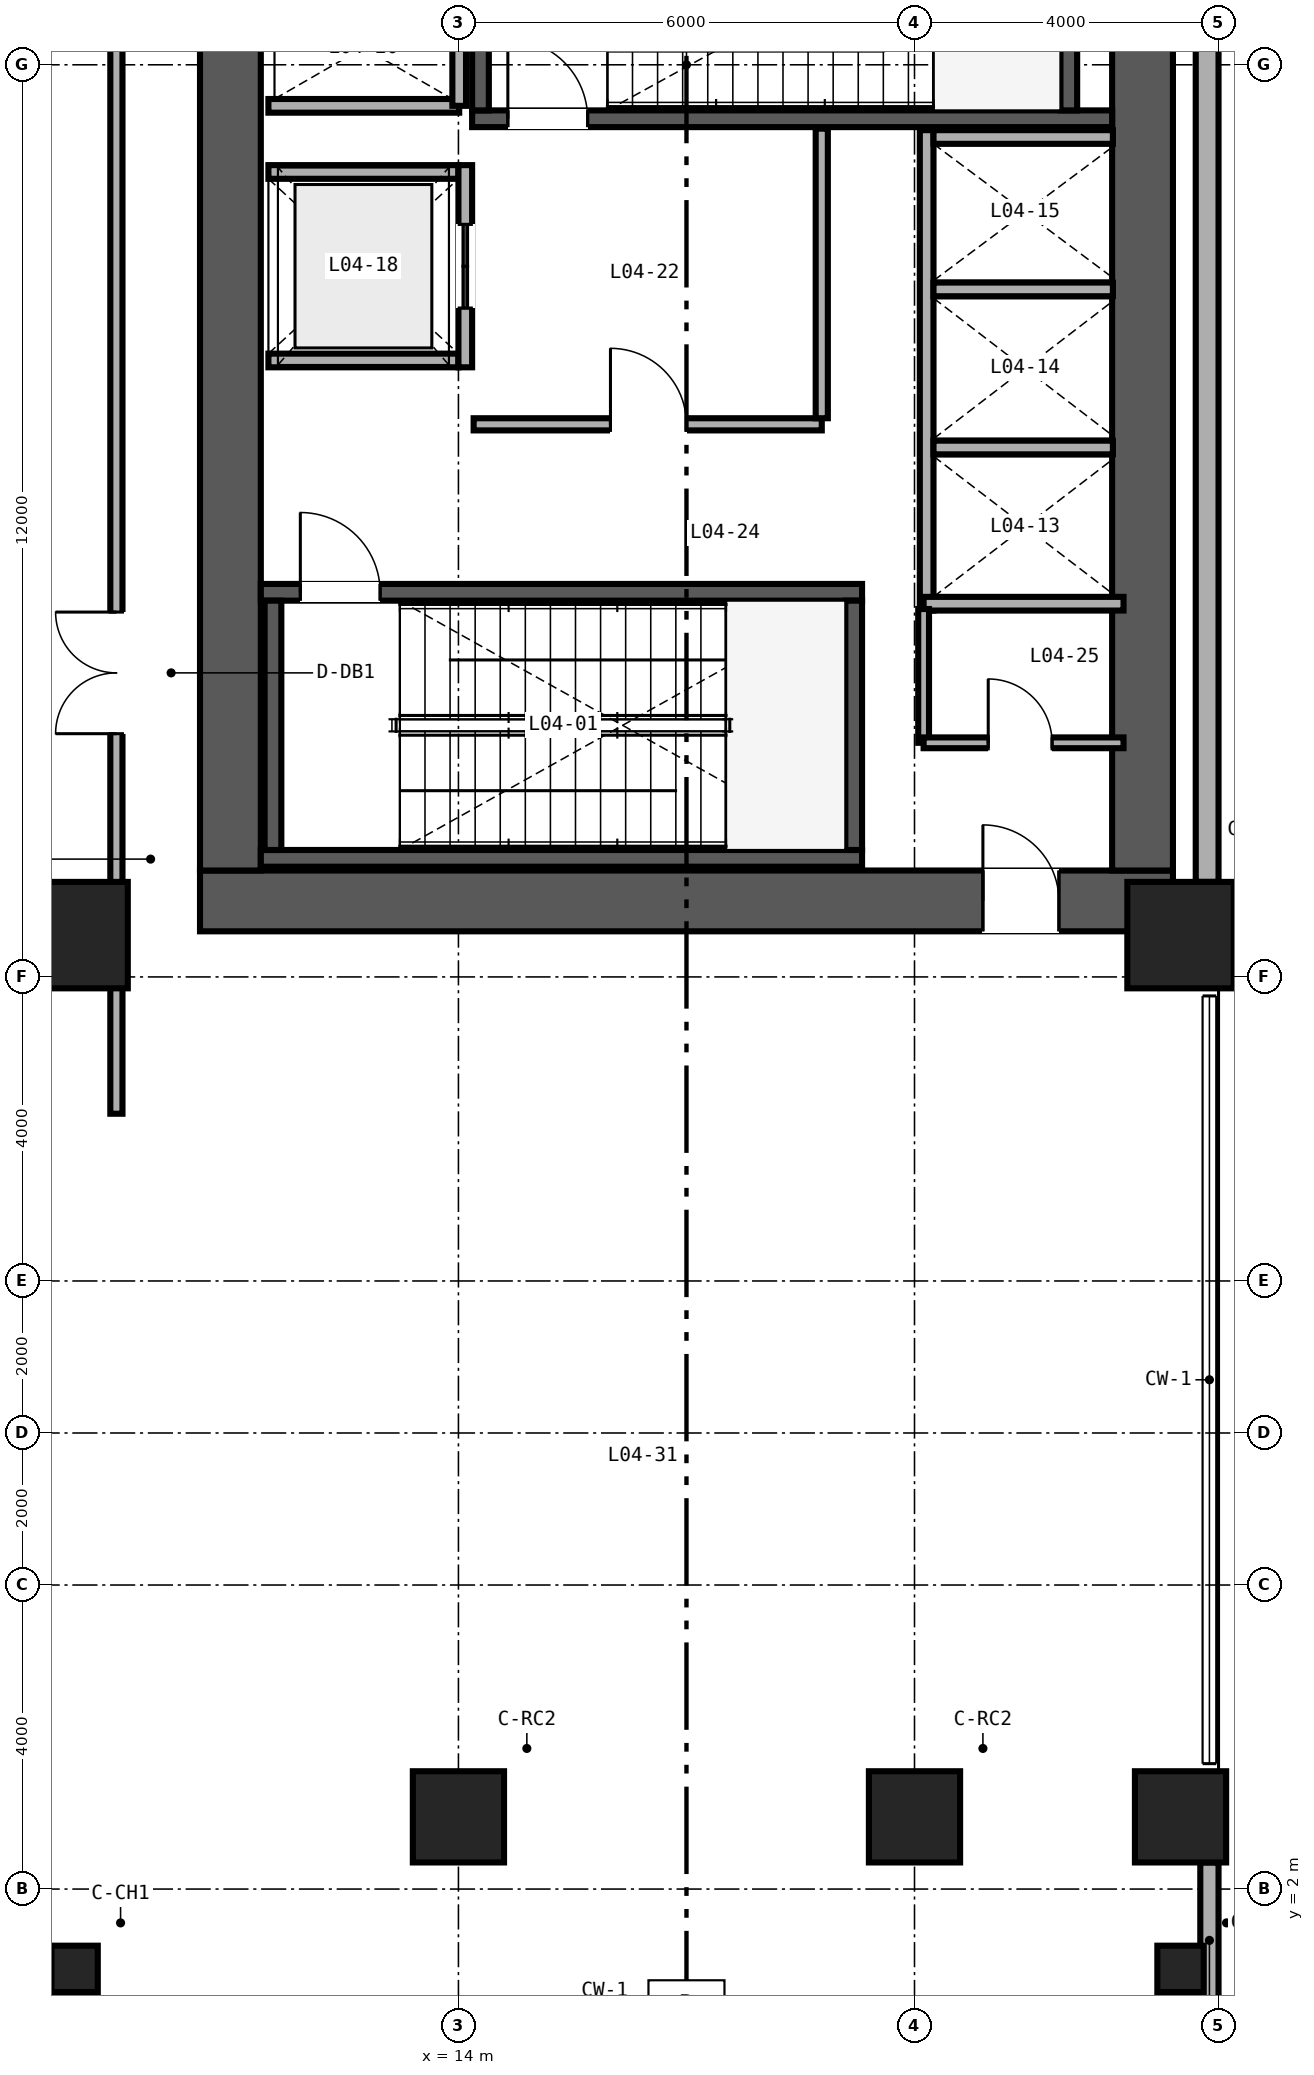
"""IFC4 building model, lengths in metres.
Left out: names, types, materials, properties, quantities, classifications, styles, units other than length and angle.
Written with IfcOpenShell. Run it as: python <this file> out.ifc"""

import sys

from ifc_helpers import new_model, si_unit, direction, frame, frame_2d, origin, origin_2d, place, context, subcontext, project, spatial, rectangle, hollow_circle, extrude, source, transform, mapped, element, fill, save


model = new_model("IFC4")
c1 = context("Model", 3, precision=1e-05, world=origin(), true_north=direction((0.0, 1.0)))
c2 = subcontext(c1, "Body", "Model", "MODEL_VIEW")
j1 = project(units=[si_unit("LENGTHUNIT", "METRE"), si_unit("PLANEANGLEUNIT", "RADIAN")], contexts=[c1])
p1 = place(None, origin())
s1 = spatial("IfcSite", under=j1, at=p1, CompositionType="ELEMENT")
p2 = place(p1, origin())
s2 = spatial("IfcBuilding", under=s1, at=p2, CompositionType="ELEMENT")
p3 = place(p2, frame((0.0, 0.0, 19.2)))
s3 = spatial("IfcBuildingStorey", under=s2, at=p3, CompositionType="ELEMENT", Elevation=19.2)
p4 = place(p3, frame((10.6, 15.0, 0.0), z_axis=(0.0, 0.0, 1.0), x_axis=(1.0, 0.0, 0.0)))
e1 = element("IfcWall", 1, at=p4, inside=s3, PredefinedType="SHEAR", context=c2, shape_type="SweptSolid", body=[
    extrude(rectangle(XDim=12.8, YDim=0.8, at=frame_2d((6.4, 0.0))), origin(), (0.0, 0.0, 1.0), 4.48),
])
p5 = place(p4, frame((10.3, 0.0, 0.0)))
e2 = element("IfcOpeningElement", 2, at=p5, cuts=e1, PredefinedType="OPENING", context=c2, shape_type="SweptSolid", body=[
    extrude(rectangle(XDim=1.0, YDim=2.15, at=frame_2d((0.5, 1.075))), frame((0.0, 0.41, 0.0), z_axis=(0.0, -1.0, 0.0), x_axis=(1.0, 0.0, 0.0)), (0.0, 0.0, 1.0), 0.82),
])
for number, where, z_axis, x_axis in (
    (3, (11.0, 15.4, 0.0), (0.0, 0.0, 1.0), (0.0, 1.0, 0.0)),
    (4, (23.0, 15.4, 0.0), (0.0, 0.0, 1.0), (0.0, 1.0, 0.0)),
):
    element("IfcWall", number, at=place(p3, frame(where, z_axis=z_axis, x_axis=x_axis)), inside=s3, PredefinedType="SHEAR", context=c2, shape_type="SweptSolid", body=[
        extrude(rectangle(XDim=21.2, YDim=0.8, at=frame_2d((10.6, 0.0))), origin(), (0.0, 0.0, 1.0), 4.48),
    ])
p6 = place(p3, frame((11.4, 15.56, 0.0), z_axis=(0.0, 0.0, 1.0), x_axis=(1.0, 0.0, 0.0)))
e5 = element("IfcWall", 5, at=p6, inside=s3, PredefinedType="SHEAR", context=c2, shape_type="SweptSolid", body=[
    extrude(rectangle(XDim=7.91, YDim=0.22, at=frame_2d((3.955, 0.0))), origin(), (0.0, 0.0, 1.0), 4.6),
])
p7 = place(p3, frame((11.4, 19.06, 0.0), z_axis=(0.0, 0.0, 1.0), x_axis=(1.0, 0.0, 0.0)))
e6 = element("IfcWall", 6, at=p7, inside=s3, PredefinedType="SHEAR", context=c2, shape_type="SweptSolid", body=[
    extrude(rectangle(XDim=7.91, YDim=0.22, at=frame_2d((3.955, 0.0))), origin(), (0.0, 0.0, 1.0), 4.6),
])
p8 = place(p7, frame((0.52, 0.0, 0.0)))
e7 = element("IfcOpeningElement", 7, at=p8, cuts=e6, PredefinedType="OPENING", context=c2, shape_type="SweptSolid", body=[
    extrude(rectangle(XDim=1.05, YDim=2.15, at=frame_2d((0.525, 1.075))), frame((0.0, 0.12, 0.0), z_axis=(0.0, -1.0, 0.0), x_axis=(1.0, 0.0, 0.0)), (0.0, 0.0, 1.0), 0.24),
])
for number, where, z_axis, x_axis in (
    (8, (11.56, 15.67, 0.0), (0.0, 0.0, 1.0), (0.0, 1.0, 0.0)),
    (9, (19.2, 15.67, 0.0), (0.0, 0.0, 1.0), (0.0, 1.0, 0.0)),
):
    element("IfcWall", number, at=place(p3, frame(where, z_axis=z_axis, x_axis=x_axis)), inside=s3, PredefinedType="SHEAR", context=c2, shape_type="SweptSolid", body=[
        extrude(rectangle(XDim=3.28, YDim=0.22, at=frame_2d((1.64, 0.0))), origin(), (0.0, 0.0, 1.0), 4.6),
    ])
p9 = place(p3, frame((14.18, 25.29, 0.0), z_axis=(0.0, 0.0, 1.0), x_axis=(1.0, 0.0, 0.0)))
e10 = element("IfcWall", 10, at=p9, inside=s3, PredefinedType="SHEAR", context=c2, shape_type="SweptSolid", body=[
    extrude(rectangle(XDim=8.42, YDim=0.22, at=frame_2d((4.21, 0.0))), origin(), (0.0, 0.0, 1.0), 4.6),
])
p10 = place(p9, frame((0.47, 0.0, 0.0)))
e11 = element("IfcOpeningElement", 11, at=p10, cuts=e10, PredefinedType="OPENING", context=c2, shape_type="SweptSolid", body=[
    extrude(rectangle(XDim=1.05, YDim=2.15, at=frame_2d((0.525, 1.075))), frame((0.0, 0.12, 0.0), z_axis=(0.0, -1.0, 0.0), x_axis=(1.0, 0.0, 0.0)), (0.0, 0.0, 1.0), 0.24),
])
for number, where, z_axis, x_axis in (
    (12, (14.29, 25.4, 0.0), (0.0, 0.0, 1.0), (0.0, 1.0, 0.0)),
    (13, (22.03, 25.4, 0.0), (0.0, 0.0, 1.0), (0.0, 1.0, 0.0)),
):
    element("IfcWall", number, at=place(p3, frame(where, z_axis=z_axis, x_axis=x_axis)), inside=s3, PredefinedType="SHEAR", context=c2, shape_type="SweptSolid", body=[
        extrude(rectangle(XDim=3.28, YDim=0.22, at=frame_2d((1.64, 0.0))), origin(), (0.0, 0.0, 1.0), 4.6),
    ])
m1 = source(origin(), c2, "Body", "SweptSolid", [
    extrude(hollow_circle(Radius=0.305, WallThickness=0.025, at=origin_2d()), origin(), (0.0, 0.0, 1.0), 4.48),
])
for number, where, z_axis, x_axis in (
    (14, (8.95, 0.95, 0.0), (0.0, 0.0, 1.0), (1.0, 0.0, 0.0)),
    (15, (23.5, 0.95, 0.0), (0.0, 0.0, 1.0), (1.0, 0.0, 0.0)),
):
    element("IfcColumn", number, at=place(p3, frame(where, z_axis=z_axis, x_axis=x_axis)), inside=s3, PredefinedType="COLUMN", context=c2, shape_type="MappedRepresentation", body=[
        mapped(m1, transform((0.0, 0.0, 0.0), scale=1.0)),
    ])
m2 = source(origin(), c2, "Body", "SweptSolid", [
    extrude(rectangle(XDim=1.4, YDim=1.4, at=origin_2d()), origin(), (0.0, 0.0, 1.0), 4.48),
])
for number, where, z_axis, x_axis in (
    (16, (8.95, 14.55, 0.0), (0.0, 0.0, 1.0), (1.0, 0.0, 0.0)),
    (17, (23.5, 14.55, 0.0), (0.0, 0.0, 1.0), (1.0, 0.0, 0.0)),
):
    element("IfcColumn", number, at=place(p3, frame(where, z_axis=z_axis, x_axis=x_axis)), inside=s3, PredefinedType="COLUMN", context=c2, shape_type="MappedRepresentation", body=[
        mapped(m2, transform((0.0, 0.0, 0.0), scale=1.0)),
    ])
m3 = source(origin(), c2, "Body", "SweptSolid", [
    extrude(rectangle(XDim=1.2, YDim=1.2, at=origin_2d()), origin(), (0.0, 0.0, 1.0), 4.48),
])
for number, where, z_axis, x_axis in (
    (18, (14.0, 2.95, 0.0), (0.0, 0.0, 1.0), (1.0, 0.0, 0.0)),
    (19, (20.0, 2.95, 0.0), (0.0, 0.0, 1.0), (1.0, 0.0, 0.0)),
    (20, (23.5, 2.95, 0.0), (0.0, 0.0, 1.0), (1.0, 0.0, 0.0)),
):
    element("IfcColumn", number, at=place(p3, frame(where, z_axis=z_axis, x_axis=x_axis)), inside=s3, PredefinedType="COLUMN", context=c2, shape_type="MappedRepresentation", body=[
        mapped(m3, transform((0.0, 0.0, 0.0), scale=1.0)),
    ])
p11 = place(p3, frame((23.88, 0.3, 0.0), z_axis=(0.0, 0.0, 1.0), x_axis=(0.0, 1.0, 0.0)))
e21 = element("IfcWall", 21, at=p11, inside=s3, PredefinedType="SOLIDWALL", context=c2, shape_type="SweptSolid", body=[
    extrude(rectangle(XDim=2.05, YDim=0.24, at=frame_2d((1.025, 0.0))), origin(), (0.0, 0.0, 1.0), 3.532),
])
p12 = place(p3, frame((23.85, 15.25, 0.0), z_axis=(0.0, 0.0, 1.0), x_axis=(0.0, 1.0, 0.0)))
e22 = element("IfcWall", 22, at=p12, inside=s3, PredefinedType="SOLIDWALL", context=c2, shape_type="SweptSolid", body=[
    extrude(rectangle(XDim=12.2, YDim=0.3, at=frame_2d((6.1, 0.0))), origin(), (0.0, 0.0, 1.0), 3.701),
])
p13 = place(p3, frame((20.16, 18.82, 0.0), z_axis=(0.0, 0.0, 1.0), x_axis=(0.0, 1.0, 0.0)))
e23 = element("IfcWall", 23, at=p13, inside=s3, PredefinedType="SOLIDWALL", context=c2, shape_type="SweptSolid", body=[
    extrude(rectangle(XDim=6.32, YDim=0.18, at=frame_2d((3.16, 0.0))), origin(), (0.0, 0.0, 1.0), 3.38),
])
p14 = place(p3, frame((20.12, 18.91, 0.0), z_axis=(0.0, 0.0, 1.0), x_axis=(1.0, 0.0, 0.0)))
e24 = element("IfcWall", 24, at=p14, inside=s3, PredefinedType="SOLIDWALL", context=c2, shape_type="SweptSolid", body=[
    extrude(rectangle(XDim=2.63, YDim=0.18, at=frame_2d((1.315, 0.0))), origin(), (0.0, 0.0, 1.0), 4.48),
])
p15 = place(p3, frame((20.25, 25.05, 0.0), z_axis=(0.0, 0.0, 1.0), x_axis=(1.0, 0.0, 0.0)))
e25 = element("IfcWall", 25, at=p15, inside=s3, PredefinedType="SOLIDWALL", context=c2, shape_type="SweptSolid", body=[
    extrude(rectangle(XDim=2.36, YDim=0.18, at=frame_2d((1.18, 0.0))), origin(), (0.0, 0.0, 1.0), 4.48),
])
p16 = place(p3, frame((20.25, 20.965, 0.0), z_axis=(0.0, 0.0, 1.0), x_axis=(1.0, 0.0, 0.0)))
e26 = element("IfcWall", 26, at=p16, inside=s3, PredefinedType="SOLIDWALL", context=c2, shape_type="SweptSolid", body=[
    extrude(rectangle(XDim=2.36, YDim=0.18, at=frame_2d((1.18, 0.0))), origin(), (0.0, 0.0, 1.0), 3.38),
])
p17 = place(p3, frame((20.25, 23.045, 0.0), z_axis=(0.0, 0.0, 1.0), x_axis=(1.0, 0.0, 0.0)))
e27 = element("IfcWall", 27, at=p17, inside=s3, PredefinedType="SOLIDWALL", context=c2, shape_type="SweptSolid", body=[
    extrude(rectangle(XDim=2.36, YDim=0.18, at=frame_2d((1.18, 0.0))), origin(), (0.0, 0.0, 1.0), 4.48),
])
for number, where, z_axis, x_axis in (
    (28, (11.5, 22.11, 0.0), (0.0, 0.0, 1.0), (1.0, 0.0, 0.0)),
    (29, (11.5, 24.59, 0.0), (0.0, 0.0, 1.0), (1.0, 0.0, 0.0)),
):
    element("IfcWall", number, at=place(p3, frame(where, z_axis=z_axis, x_axis=x_axis)), inside=s3, PredefinedType="SOLIDWALL", context=c2, shape_type="SweptSolid", body=[
        extrude(rectangle(XDim=2.5, YDim=0.18, at=frame_2d((1.25, 0.0))), origin(), (0.0, 0.0, 1.0), 4.48),
    ])
p18 = place(p3, frame((14.09, 22.02, 0.0), z_axis=(0.0, 0.0, 1.0), x_axis=(0.0, 1.0, 0.0)))
e30 = element("IfcWall", 30, at=p18, inside=s3, PredefinedType="SOLIDWALL", context=c2, shape_type="SweptSolid", body=[
    extrude(rectangle(XDim=2.66, YDim=0.18, at=frame_2d((1.33, 0.0))), origin(), (0.0, 0.0, 1.0), 4.48),
])
p19 = place(p18, frame((0.78, 0.0, 0.0)))
e31 = element("IfcOpeningElement", 31, at=p19, cuts=e30, PredefinedType="OPENING", context=c2, shape_type="SweptSolid", body=[
    extrude(rectangle(XDim=1.1, YDim=2.2, at=frame_2d((0.55, 1.1))), frame((0.0, 0.1, 0.0), z_axis=(0.0, -1.0, 0.0), x_axis=(1.0, 0.0, 0.0)), (0.0, 0.0, 1.0), 0.2),
])
p20 = place(p3, frame((11.5, 25.46, 0.0), z_axis=(0.0, 0.0, 1.0), x_axis=(1.0, 0.0, 0.0)))
e32 = element("IfcWall", 32, at=p20, inside=s3, PredefinedType="SOLIDWALL", context=c2, shape_type="SweptSolid", body=[
    extrude(rectangle(XDim=2.51, YDim=0.18, at=frame_2d((1.255, 0.0))), origin(), (0.0, 0.0, 1.0), 4.48),
])
p21 = place(p3, frame((14.01, 25.46, 0.0), z_axis=(0.0, 0.0, 1.0), x_axis=(0.0, 1.0, 0.0)))
e33 = element("IfcWall", 33, at=p21, inside=s3, PredefinedType="SOLIDWALL", context=c2, shape_type="SweptSolid", body=[
    extrude(rectangle(XDim=3.08, YDim=0.18, at=frame_2d((1.54, 0.0))), origin(), (0.0, 0.0, 1.0), 4.48),
])
p22 = place(p3, frame((14.2, 21.27, 0.0), z_axis=(0.0, 0.0, 1.0), x_axis=(1.0, 0.0, 0.0)))
e34 = element("IfcWall", 34, at=p22, inside=s3, PredefinedType="PARTITIONING", context=c2, shape_type="SweptSolid", body=[
    extrude(rectangle(XDim=4.58, YDim=0.16, at=frame_2d((2.29, 0.0))), origin(), (0.0, 0.0, 1.0), 4.48),
])
p23 = place(p22, frame((1.8, 0.0, 0.0)))
e35 = element("IfcOpeningElement", 35, at=p23, cuts=e34, PredefinedType="OPENING", context=c2, shape_type="SweptSolid", body=[
    extrude(rectangle(XDim=1.0, YDim=2.15, at=frame_2d((0.5, 1.075))), frame((0.0, 0.09, 0.0), z_axis=(0.0, -1.0, 0.0), x_axis=(1.0, 0.0, 0.0)), (0.0, 0.0, 1.0), 0.18),
])
p24 = place(p3, frame((18.78, 21.35, 0.0), z_axis=(0.0, 0.0, 1.0), x_axis=(0.0, 1.0, 0.0)))
e36 = element("IfcWall", 36, at=p24, inside=s3, PredefinedType="PARTITIONING", context=c2, shape_type="SweptSolid", body=[
    extrude(rectangle(XDim=3.81, YDim=0.16, at=frame_2d((1.905, 0.0))), origin(), (0.0, 0.0, 1.0), 4.48),
])
p25 = place(p3, frame((20.12, 17.08, 0.0), z_axis=(0.0, 0.0, 1.0), x_axis=(0.0, 1.0, 0.0)))
e37 = element("IfcWall", 37, at=p25, inside=s3, PredefinedType="PARTITIONING", context=c2, shape_type="SweptSolid", body=[
    extrude(rectangle(XDim=1.76, YDim=0.142, at=frame_2d((0.88, 0.0))), origin(), (0.0, 0.0, 1.0), 4.48),
])
p26 = place(p3, frame((20.12, 17.08, 0.0), z_axis=(0.0, 0.0, 1.0), x_axis=(1.0, 0.0, 0.0)))
e38 = element("IfcWall", 38, at=p26, inside=s3, PredefinedType="PARTITIONING", context=c2, shape_type="SweptSolid", body=[
    extrude(rectangle(XDim=2.63, YDim=0.142, at=frame_2d((1.315, 0.0))), origin(), (0.0, 0.0, 1.0), 4.48),
])
p27 = place(p26, frame((0.85, 0.0, 0.0)))
e39 = element("IfcOpeningElement", 39, at=p27, cuts=e38, PredefinedType="OPENING", context=c2, shape_type="SweptSolid", body=[
    extrude(rectangle(XDim=0.84, YDim=2.1, at=frame_2d((0.42, 1.05))), frame((0.0, 0.081, 0.0), z_axis=(0.0, -1.0, 0.0), x_axis=(1.0, 0.0, 0.0)), (0.0, 0.0, 1.0), 0.162),
])
p28 = place(p3, frame((9.5, 12.2, 0.0), z_axis=(0.0, 0.0, 1.0), x_axis=(0.0, 1.0, 0.0)))
e40 = element("IfcWall", 40, at=p28, inside=s3, PredefinedType="PARTITIONING", context=c2, shape_type="SweptSolid", body=[
    extrude(rectangle(XDim=31.6, YDim=0.16, at=frame_2d((15.8, 0.0))), origin(), (0.0, 0.0, 1.0), 3.553),
])
p29 = place(p28, frame((5.0, 0.0, 0.0)))
e41 = element("IfcOpeningElement", 41, at=p29, cuts=e40, PredefinedType="OPENING", context=c2, shape_type="SweptSolid", body=[
    extrude(rectangle(XDim=1.6, YDim=2.3, at=frame_2d((0.8, 1.15))), frame((0.0, 0.09, 0.0), z_axis=(0.0, -1.0, 0.0), x_axis=(1.0, 0.0, 0.0)), (0.0, 0.0, 1.0), 0.18),
])
p30 = place(p28, frame((27.0, 0.0, 0.0)))
e42 = element("IfcOpeningElement", 42, at=p30, cuts=e40, PredefinedType="OPENING", context=c2, shape_type="SweptSolid", body=[
    extrude(rectangle(XDim=1.6, YDim=2.3, at=frame_2d((0.8, 1.15))), frame((0.0, 0.09, 0.0), z_axis=(0.0, -1.0, 0.0), x_axis=(1.0, 0.0, 0.0)), (0.0, 0.0, 1.0), 0.18),
])
m4 = source(origin(), c2, "Body", "SweptSolid", [
    extrude(rectangle(XDim=1.05, YDim=2.15, at=frame_2d((0.525, 1.075))), frame((0.0, 0.025, 0.0), z_axis=(0.0, -1.0, 0.0), x_axis=(1.0, 0.0, 0.0)), (0.0, 0.0, 1.0), 0.05),
])
p31 = place(p8, origin())
e43 = element("IfcDoor", 43, at=p31, inside=s3, OperationType="SINGLE_SWING_LEFT", PredefinedType="DOOR", context=c2, shape_type="MappedRepresentation", body=[
    mapped(m4, transform((0.0, 0.0, 0.0), scale=1.0)),
])
fill(e7, e43)
p32 = place(p10, origin())
e44 = element("IfcDoor", 44, at=p32, inside=s3, OperationType="SINGLE_SWING_LEFT", PredefinedType="DOOR", context=c2, shape_type="MappedRepresentation", body=[
    mapped(m4, transform((0.0, 0.0, 0.0), scale=1.0)),
])
fill(e11, e44)
m5 = source(origin(), c2, "Body", "SweptSolid", [
    extrude(rectangle(XDim=1.1, YDim=2.2, at=frame_2d((0.55, 1.1))), frame((0.0, 0.025, 0.0), z_axis=(0.0, -1.0, 0.0), x_axis=(1.0, 0.0, 0.0)), (0.0, 0.0, 1.0), 0.05),
])
p33 = place(p19, origin())
e45 = element("IfcDoor", 45, at=p33, inside=s3, OperationType="DOUBLE_DOOR_SLIDING", PredefinedType="DOOR", context=c2, shape_type="MappedRepresentation", body=[
    mapped(m5, transform((0.0, 0.0, 0.0), scale=1.0)),
])
fill(e31, e45)
m6 = source(origin(), c2, "Body", "SweptSolid", [
    extrude(rectangle(XDim=1.0, YDim=2.15, at=frame_2d((0.5, 1.075))), frame((0.0, 0.025, 0.0), z_axis=(0.0, -1.0, 0.0), x_axis=(1.0, 0.0, 0.0)), (0.0, 0.0, 1.0), 0.05),
])
p34 = place(p23, origin())
e46 = element("IfcDoor", 46, at=p34, inside=s3, OperationType="SINGLE_SWING_LEFT", PredefinedType="DOOR", context=c2, shape_type="MappedRepresentation", body=[
    mapped(m6, transform((0.0, 0.0, 0.0), scale=1.0)),
])
fill(e35, e46)
m7 = source(origin(), c2, "Body", "SweptSolid", [
    extrude(rectangle(XDim=0.84, YDim=2.1, at=frame_2d((0.42, 1.05))), frame((0.0, 0.025, 0.0), z_axis=(0.0, -1.0, 0.0), x_axis=(1.0, 0.0, 0.0)), (0.0, 0.0, 1.0), 0.05),
])
p35 = place(p27, origin())
e47 = element("IfcDoor", 47, at=p35, inside=s3, OperationType="SINGLE_SWING_LEFT", PredefinedType="DOOR", context=c2, shape_type="MappedRepresentation", body=[
    mapped(m7, transform((0.0, 0.0, 0.0), scale=1.0)),
])
fill(e39, e47)
p36 = place(p5, origin())
e48 = element("IfcDoor", 48, at=p36, inside=s3, OperationType="SINGLE_SWING_LEFT", PredefinedType="DOOR", context=c2, shape_type="MappedRepresentation", body=[
    mapped(m6, transform((0.0, 0.0, 0.0), scale=1.0)),
])
fill(e2, e48)
m8 = source(origin(), c2, "Body", "SweptSolid", [
    extrude(rectangle(XDim=1.6, YDim=2.3, at=frame_2d((0.8, 1.15))), frame((0.0, 0.025, 0.0), z_axis=(0.0, -1.0, 0.0), x_axis=(1.0, 0.0, 0.0)), (0.0, 0.0, 1.0), 0.05),
])
p37 = place(p29, origin())
e49 = element("IfcDoor", 49, at=p37, inside=s3, OperationType="DOUBLE_DOOR_SINGLE_SWING", PredefinedType="DOOR", context=c2, shape_type="MappedRepresentation", body=[
    mapped(m8, transform((0.0, 0.0, 0.0), scale=1.0)),
])
fill(e41, e49)
save(model, sys.argv[1])
